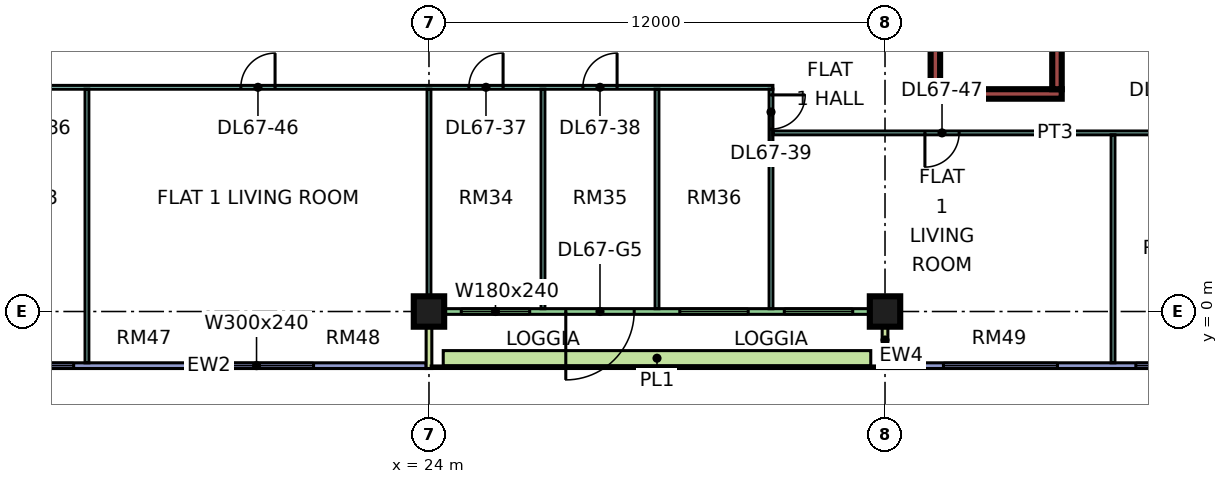
"""IFC4 building model, lengths in metres.
Left out: names, types, materials, properties, quantities, classifications, styles, units other than length and angle.
Written with IfcOpenShell. Run it as: python <this file> out.ifc"""

import sys

from ifc_helpers import new_model, si_unit, direction, frame, frame_2d, origin, origin_2d, place, context, subcontext, project, spatial, rectangle, extrude, element, fill, save


model = new_model("IFC4")
c1 = context("Model", 3, precision=1e-05, world=origin(), true_north=direction((0.0, 1.0)))
c2 = subcontext(c1, "Body", "Model", "MODEL_VIEW")
j1 = project(units=[si_unit("LENGTHUNIT", "METRE"), si_unit("PLANEANGLEUNIT", "RADIAN")], contexts=[c1])
p1 = place(None, origin())
s1 = spatial("IfcSite", under=j1, at=p1, CompositionType="ELEMENT")
p2 = place(p1, origin())
s2 = spatial("IfcBuilding", under=s1, at=p2, CompositionType="ELEMENT")
p3 = place(p2, frame((0.0, 0.0, 288.4)))
s3 = spatial("IfcBuildingStorey", under=s2, at=p3, CompositionType="ELEMENT", Elevation=288.4)
for number, where, z_axis, x_axis in (
    (1, (24.0, 0.0, 0.0), (0.0, 0.0, 1.0), (1.0, 0.0, 0.0)),
    (2, (36.0, 0.0, 0.0), (0.0, 0.0, 1.0), (1.0, 0.0, 0.0)),
):
    element("IfcColumn", number, at=place(p3, frame(where, z_axis=z_axis, x_axis=x_axis)), inside=s3, PredefinedType="COLUMN", context=c2, shape_type="SweptSolid", body=[
        extrude(rectangle(XDim=0.8, YDim=0.8, at=origin_2d()), origin(), (0.0, 0.0, 1.0), 3.75),
    ])
p4 = place(p3, frame((37.2, 5.725, 0.0), z_axis=(0.0, 0.0, 1.0), x_axis=(1.0, 0.0, 0.0)))
e3 = element("IfcWall", 3, at=p4, inside=s3, PredefinedType="SHEAR", context=c2, shape_type="SweptSolid", body=[
    extrude(rectangle(XDim=3.45, YDim=0.25, at=frame_2d((1.725, 0.0))), origin(), (0.0, 0.0, 1.0), 3.75),
])
for number, where, z_axis, x_axis in (
    (4, (37.325, 5.85, 0.0), (0.0, 0.0, 1.0), (0.0, 1.0, 0.0)),
    (5, (40.525, 5.85, 0.0), (0.0, 0.0, 1.0), (0.0, 1.0, 0.0)),
):
    element("IfcWall", number, at=place(p3, frame(where, z_axis=z_axis, x_axis=x_axis)), inside=s3, PredefinedType="SHEAR", context=c2, shape_type="SweptSolid", body=[
        extrude(rectangle(XDim=6.5, YDim=0.25, at=frame_2d((3.25, 0.0))), origin(), (0.0, 0.0, 1.0), 3.75),
    ])
p5 = place(p3, frame((12.5, -1.425, 0.0), z_axis=(0.0, 0.0, 1.0), x_axis=(1.0, 0.0, 0.0)))
e6 = element("IfcWall", 6, at=p5, inside=s3, PredefinedType="SOLIDWALL", context=c2, shape_type="SweptSolid", body=[
    extrude(rectangle(XDim=11.425, YDim=0.15, at=frame_2d((5.712, 0.0))), origin(), (0.0, 0.0, 1.0), 3.35),
])
p6 = place(p5, frame((0.35, 0.0, 0.45)))
e7 = element("IfcOpeningElement", 7, at=p6, cuts=e6, PredefinedType="OPENING", context=c2, shape_type="SweptSolid", body=[
    extrude(rectangle(XDim=1.8, YDim=2.4, at=frame_2d((0.9, 1.2))), frame((0.0, 0.085, 0.0), z_axis=(0.0, -1.0, 0.0), x_axis=(1.0, 0.0, 0.0)), (0.0, 0.0, 1.0), 0.17),
])
p7 = place(p5, frame((5.462, 0.0, 0.45)))
e8 = element("IfcOpeningElement", 8, at=p7, cuts=e6, PredefinedType="OPENING", context=c2, shape_type="SweptSolid", body=[
    extrude(rectangle(XDim=3.0, YDim=2.4, at=frame_2d((1.5, 1.2))), frame((0.0, 0.085, 0.0), z_axis=(0.0, -1.0, 0.0), x_axis=(1.0, 0.0, 0.0)), (0.0, 0.0, 1.0), 0.17),
])
p8 = place(p3, frame((24.075, 0.0, 0.0), z_axis=(0.0, 0.0, 1.0), x_axis=(1.0, 0.0, 0.0)))
e9 = element("IfcWall", 9, at=p8, inside=s3, PredefinedType="SOLIDWALL", context=c2, shape_type="SweptSolid", body=[
    extrude(rectangle(XDim=11.85, YDim=0.15, at=frame_2d((5.925, 0.0))), origin(), (0.0, 0.0, 1.0), 3.35),
])
p9 = place(p8, frame((0.775, 0.0, 0.45)))
e10 = element("IfcOpeningElement", 10, at=p9, cuts=e9, PredefinedType="OPENING", context=c2, shape_type="SweptSolid", body=[
    extrude(rectangle(XDim=1.8, YDim=2.4, at=frame_2d((0.9, 1.2))), frame((0.0, 0.085, 0.0), z_axis=(0.0, -1.0, 0.0), x_axis=(1.0, 0.0, 0.0)), (0.0, 0.0, 1.0), 0.17),
])
p10 = place(p8, frame((3.525, 0.0, 0.0)))
e11 = element("IfcOpeningElement", 11, at=p10, cuts=e9, PredefinedType="OPENING", context=c2, shape_type="SweptSolid", body=[
    extrude(rectangle(XDim=1.8, YDim=2.4, at=frame_2d((0.9, 1.2))), frame((0.0, 0.085, 0.0), z_axis=(0.0, -1.0, 0.0), x_axis=(1.0, 0.0, 0.0)), (0.0, 0.0, 1.0), 0.17),
])
p11 = place(p8, frame((6.525, 0.0, 0.45)))
e12 = element("IfcOpeningElement", 12, at=p11, cuts=e9, PredefinedType="OPENING", context=c2, shape_type="SweptSolid", body=[
    extrude(rectangle(XDim=1.8, YDim=2.4, at=frame_2d((0.9, 1.2))), frame((0.0, 0.085, 0.0), z_axis=(0.0, -1.0, 0.0), x_axis=(1.0, 0.0, 0.0)), (0.0, 0.0, 1.0), 0.17),
])
p12 = place(p8, frame((9.275, 0.0, 0.45)))
e13 = element("IfcOpeningElement", 13, at=p12, cuts=e9, PredefinedType="OPENING", context=c2, shape_type="SweptSolid", body=[
    extrude(rectangle(XDim=1.8, YDim=2.4, at=frame_2d((0.9, 1.2))), frame((0.0, 0.085, 0.0), z_axis=(0.0, -1.0, 0.0), x_axis=(1.0, 0.0, 0.0)), (0.0, 0.0, 1.0), 0.17),
])
for number, where, z_axis, x_axis in (
    (14, (24.0, -1.5, 0.0), (0.0, 0.0, 1.0), (0.0, 1.0, 0.0)),
    (15, (36.0, -1.5, 0.0), (0.0, 0.0, 1.0), (0.0, 1.0, 0.0)),
):
    element("IfcWall", number, at=place(p3, frame(where, z_axis=z_axis, x_axis=x_axis)), inside=s3, PredefinedType="SOLIDWALL", context=c2, shape_type="SweptSolid", body=[
        extrude(rectangle(XDim=1.5, YDim=0.15, at=frame_2d((0.75, 0.0))), origin(), (0.0, 0.0, 1.0), 3.35),
    ])
p13 = place(p3, frame((36.075, -1.425, 0.0), z_axis=(0.0, 0.0, 1.0), x_axis=(1.0, 0.0, 0.0)))
e16 = element("IfcWall", 16, at=p13, inside=s3, PredefinedType="SOLIDWALL", context=c2, shape_type="SweptSolid", body=[
    extrude(rectangle(XDim=11.85, YDim=0.15, at=frame_2d((5.925, 0.0))), origin(), (0.0, 0.0, 1.0), 3.35),
])
p14 = place(p13, frame((1.462, 0.0, 0.45)))
e17 = element("IfcOpeningElement", 17, at=p14, cuts=e16, PredefinedType="OPENING", context=c2, shape_type="SweptSolid", body=[
    extrude(rectangle(XDim=3.0, YDim=2.4, at=frame_2d((1.5, 1.2))), frame((0.0, 0.085, 0.0), z_axis=(0.0, -1.0, 0.0), x_axis=(1.0, 0.0, 0.0)), (0.0, 0.0, 1.0), 0.17),
])
p15 = place(p13, frame((6.525, 0.0, 0.45)))
e18 = element("IfcOpeningElement", 18, at=p15, cuts=e16, PredefinedType="OPENING", context=c2, shape_type="SweptSolid", body=[
    extrude(rectangle(XDim=1.8, YDim=2.4, at=frame_2d((0.9, 1.2))), frame((0.0, 0.085, 0.0), z_axis=(0.0, -1.0, 0.0), x_axis=(1.0, 0.0, 0.0)), (0.0, 0.0, 1.0), 0.17),
])
p16 = place(p13, frame((9.488, 0.0, 0.45)))
e19 = element("IfcOpeningElement", 19, at=p16, cuts=e16, PredefinedType="OPENING", context=c2, shape_type="SweptSolid", body=[
    extrude(rectangle(XDim=1.8, YDim=2.4, at=frame_2d((0.9, 1.2))), frame((0.0, 0.085, 0.0), z_axis=(0.0, -1.0, 0.0), x_axis=(1.0, 0.0, 0.0)), (0.0, 0.0, 1.0), 0.17),
])
p17 = place(p3, frame((24.375, -1.229, 0.0), z_axis=(0.0, 0.0, 1.0), x_axis=(1.0, 0.0, 0.0)))
e20 = element("IfcWall", 20, at=p17, inside=s3, PredefinedType="SOLIDWALL", context=c2, shape_type="SweptSolid", body=[
    extrude(rectangle(XDim=11.25, YDim=0.4, at=frame_2d((5.625, 0.0))), origin(), (0.0, 0.0, 1.0), 0.7),
])
p18 = place(p3, frame((11.95, 5.9, 0.0), z_axis=(0.0, 0.0, 1.0), x_axis=(1.0, 0.0, 0.0)))
e21 = element("IfcWall", 21, at=p18, inside=s3, PredefinedType="PARTITIONING", context=c2, shape_type="SweptSolid", body=[
    extrude(rectangle(XDim=21.1, YDim=0.1, at=frame_2d((10.55, 0.0))), origin(), (0.0, 0.0, 1.0), 3.35),
])
p19 = place(p18, frame((1.1, 0.0, 0.0)))
e22 = element("IfcOpeningElement", 22, at=p19, cuts=e21, PredefinedType="OPENING", context=c2, shape_type="SweptSolid", body=[
    extrude(rectangle(XDim=0.9, YDim=2.1, at=frame_2d((0.45, 1.05))), frame((0.0, 0.06, 0.0), z_axis=(0.0, -1.0, 0.0), x_axis=(1.0, 0.0, 0.0)), (0.0, 0.0, 1.0), 0.12),
])
p20 = place(p18, frame((13.1, 0.0, 0.0)))
e23 = element("IfcOpeningElement", 23, at=p20, cuts=e21, PredefinedType="OPENING", context=c2, shape_type="SweptSolid", body=[
    extrude(rectangle(XDim=0.9, YDim=2.1, at=frame_2d((0.45, 1.05))), frame((0.0, 0.06, 0.0), z_axis=(0.0, -1.0, 0.0), x_axis=(1.0, 0.0, 0.0)), (0.0, 0.0, 1.0), 0.12),
])
p21 = place(p18, frame((16.1, 0.0, 0.0)))
e24 = element("IfcOpeningElement", 24, at=p21, cuts=e21, PredefinedType="OPENING", context=c2, shape_type="SweptSolid", body=[
    extrude(rectangle(XDim=0.9, YDim=2.1, at=frame_2d((0.45, 1.05))), frame((0.0, 0.06, 0.0), z_axis=(0.0, -1.0, 0.0), x_axis=(1.0, 0.0, 0.0)), (0.0, 0.0, 1.0), 0.12),
])
p22 = place(p18, frame((7.1, 0.0, 0.0)))
e25 = element("IfcOpeningElement", 25, at=p22, cuts=e21, PredefinedType="OPENING", context=c2, shape_type="SweptSolid", body=[
    extrude(rectangle(XDim=0.9, YDim=2.1, at=frame_2d((0.45, 1.05))), frame((0.0, 0.06, 0.0), z_axis=(0.0, -1.0, 0.0), x_axis=(1.0, 0.0, 0.0)), (0.0, 0.0, 1.0), 0.12),
])
p23 = place(p3, frame((15.0, -1.35, 0.0), z_axis=(0.0, 0.0, 1.0), x_axis=(0.0, 1.0, 0.0)))
e26 = element("IfcWall", 26, at=p23, inside=s3, PredefinedType="PARTITIONING", context=c2, shape_type="SweptSolid", body=[
    extrude(rectangle(XDim=7.2, YDim=0.1, at=frame_2d((3.6, 0.0))), origin(), (0.0, 0.0, 1.0), 3.35),
])
p24 = place(p3, frame((24.0, 0.0, 0.0), z_axis=(0.0, 0.0, 1.0), x_axis=(0.0, 1.0, 0.0)))
e27 = element("IfcWall", 27, at=p24, inside=s3, PredefinedType="PARTITIONING", context=c2, shape_type="SweptSolid", body=[
    extrude(rectangle(XDim=5.85, YDim=0.1, at=frame_2d((2.925, 0.0))), origin(), (0.0, 0.0, 1.0), 3.35),
])
for number, where, z_axis, x_axis in (
    (28, (27.0, 0.074, 0.0), (0.0, 0.0, 1.0), (0.0, 1.0, 0.0)),
    (29, (30.0, 0.074, 0.0), (0.0, 0.0, 1.0), (0.0, 1.0, 0.0)),
):
    element("IfcWall", number, at=place(p3, frame(where, z_axis=z_axis, x_axis=x_axis)), inside=s3, PredefinedType="PARTITIONING", context=c2, shape_type="SweptSolid", body=[
        extrude(rectangle(XDim=5.776, YDim=0.1, at=frame_2d((2.888, 0.0))), origin(), (0.0, 0.0, 1.0), 3.35),
    ])
p25 = place(p3, frame((33.0, 0.074, 0.0), z_axis=(0.0, 0.0, 1.0), x_axis=(0.0, 1.0, 0.0)))
e30 = element("IfcWall", 30, at=p25, inside=s3, PredefinedType="PARTITIONING", context=c2, shape_type="SweptSolid", body=[
    extrude(rectangle(XDim=5.776, YDim=0.1, at=frame_2d((2.888, 0.0))), origin(), (0.0, 0.0, 1.0), 3.35),
])
p26 = place(p25, frame((4.726, 0.0, 0.0)))
e31 = element("IfcOpeningElement", 31, at=p26, cuts=e30, PredefinedType="OPENING", context=c2, shape_type="SweptSolid", body=[
    extrude(rectangle(XDim=0.9, YDim=2.1, at=frame_2d((0.45, 1.05))), frame((0.0, 0.06, 0.0), z_axis=(0.0, -1.0, 0.0), x_axis=(1.0, 0.0, 0.0)), (0.0, 0.0, 1.0), 0.12),
])
p27 = place(p3, frame((33.05, 4.7, 0.0), z_axis=(0.0, 0.0, 1.0), x_axis=(1.0, 0.0, 0.0)))
e32 = element("IfcWall", 32, at=p27, inside=s3, PredefinedType="PARTITIONING", context=c2, shape_type="SweptSolid", body=[
    extrude(rectangle(XDim=14.85, YDim=0.1, at=frame_2d((7.425, 0.0))), origin(), (0.0, 0.0, 1.0), 3.35),
])
p28 = place(p27, frame((10.0, 0.0, 0.0)))
e33 = element("IfcOpeningElement", 33, at=p28, cuts=e32, PredefinedType="OPENING", context=c2, shape_type="SweptSolid", body=[
    extrude(rectangle(XDim=0.9, YDim=2.1, at=frame_2d((0.45, 1.05))), frame((0.0, 0.06, 0.0), z_axis=(0.0, -1.0, 0.0), x_axis=(1.0, 0.0, 0.0)), (0.0, 0.0, 1.0), 0.12),
])
p29 = place(p27, frame((13.0, 0.0, 0.0)))
e34 = element("IfcOpeningElement", 34, at=p29, cuts=e32, PredefinedType="OPENING", context=c2, shape_type="SweptSolid", body=[
    extrude(rectangle(XDim=0.9, YDim=2.1, at=frame_2d((0.45, 1.05))), frame((0.0, 0.06, 0.0), z_axis=(0.0, -1.0, 0.0), x_axis=(1.0, 0.0, 0.0)), (0.0, 0.0, 1.0), 0.12),
])
p30 = place(p27, frame((4.0, 0.0, 0.0)))
e35 = element("IfcOpeningElement", 35, at=p30, cuts=e32, PredefinedType="OPENING", context=c2, shape_type="SweptSolid", body=[
    extrude(rectangle(XDim=0.9, YDim=2.1, at=frame_2d((0.45, 1.05))), frame((0.0, 0.06, 0.0), z_axis=(0.0, -1.0, 0.0), x_axis=(1.0, 0.0, 0.0)), (0.0, 0.0, 1.0), 0.12),
])
p31 = place(p3, frame((42.0, -1.35, 0.0), z_axis=(0.0, 0.0, 1.0), x_axis=(0.0, 1.0, 0.0)))
e36 = element("IfcWall", 36, at=p31, inside=s3, PredefinedType="PARTITIONING", context=c2, shape_type="SweptSolid", body=[
    extrude(rectangle(XDim=6.0, YDim=0.1, at=frame_2d((3.0, 0.0))), origin(), (0.0, 0.0, 1.0), 3.35),
])
p32 = place(p6, origin())
e37 = element("IfcWindow", 37, at=p32, inside=s3, PartitioningType="SINGLE_PANEL", PredefinedType="WINDOW", context=c2, shape_type="SweptSolid", body=[
    extrude(rectangle(XDim=1.8, YDim=2.4, at=frame_2d((0.9, 1.2))), frame((0.0, 0.03, 0.0), z_axis=(0.0, -1.0, 0.0), x_axis=(1.0, 0.0, 0.0)), (0.0, 0.0, 1.0), 0.06),
])
fill(e7, e37)
p33 = place(p7, origin())
e38 = element("IfcWindow", 38, at=p33, inside=s3, PartitioningType="SINGLE_PANEL", PredefinedType="WINDOW", context=c2, shape_type="SweptSolid", body=[
    extrude(rectangle(XDim=3.0, YDim=2.4, at=frame_2d((1.5, 1.2))), frame((0.0, 0.03, 0.0), z_axis=(0.0, -1.0, 0.0), x_axis=(1.0, 0.0, 0.0)), (0.0, 0.0, 1.0), 0.06),
])
fill(e8, e38)
p34 = place(p9, origin())
e39 = element("IfcWindow", 39, at=p34, inside=s3, PartitioningType="SINGLE_PANEL", PredefinedType="WINDOW", context=c2, shape_type="SweptSolid", body=[
    extrude(rectangle(XDim=1.8, YDim=2.4, at=frame_2d((0.9, 1.2))), frame((0.0, 0.03, 0.0), z_axis=(0.0, -1.0, 0.0), x_axis=(1.0, 0.0, 0.0)), (0.0, 0.0, 1.0), 0.06),
])
fill(e10, e39)
p35 = place(p10, frame((1.8, 0.0, 0.0), z_axis=(0.0, 0.0, 1.0), x_axis=(-1.0, 0.0, 0.0)))
e40 = element("IfcDoor", 40, at=p35, inside=s3, OperationType="DOUBLE_DOOR_SINGLE_SWING", PredefinedType="DOOR", context=c2, shape_type="SweptSolid", body=[
    extrude(rectangle(XDim=1.8, YDim=2.4, at=frame_2d((0.9, 1.2))), frame((0.0, 0.025, 0.0), z_axis=(0.0, -1.0, 0.0), x_axis=(1.0, 0.0, 0.0)), (0.0, 0.0, 1.0), 0.05),
])
fill(e11, e40)
p36 = place(p11, origin())
e41 = element("IfcWindow", 41, at=p36, inside=s3, PartitioningType="SINGLE_PANEL", PredefinedType="WINDOW", context=c2, shape_type="SweptSolid", body=[
    extrude(rectangle(XDim=1.8, YDim=2.4, at=frame_2d((0.9, 1.2))), frame((0.0, 0.03, 0.0), z_axis=(0.0, -1.0, 0.0), x_axis=(1.0, 0.0, 0.0)), (0.0, 0.0, 1.0), 0.06),
])
fill(e12, e41)
p37 = place(p12, origin())
e42 = element("IfcWindow", 42, at=p37, inside=s3, PartitioningType="SINGLE_PANEL", PredefinedType="WINDOW", context=c2, shape_type="SweptSolid", body=[
    extrude(rectangle(XDim=1.8, YDim=2.4, at=frame_2d((0.9, 1.2))), frame((0.0, 0.03, 0.0), z_axis=(0.0, -1.0, 0.0), x_axis=(1.0, 0.0, 0.0)), (0.0, 0.0, 1.0), 0.06),
])
fill(e13, e42)
p38 = place(p14, origin())
e43 = element("IfcWindow", 43, at=p38, inside=s3, PartitioningType="SINGLE_PANEL", PredefinedType="WINDOW", context=c2, shape_type="SweptSolid", body=[
    extrude(rectangle(XDim=3.0, YDim=2.4, at=frame_2d((1.5, 1.2))), frame((0.0, 0.03, 0.0), z_axis=(0.0, -1.0, 0.0), x_axis=(1.0, 0.0, 0.0)), (0.0, 0.0, 1.0), 0.06),
])
fill(e17, e43)
p39 = place(p15, origin())
e44 = element("IfcWindow", 44, at=p39, inside=s3, PartitioningType="SINGLE_PANEL", PredefinedType="WINDOW", context=c2, shape_type="SweptSolid", body=[
    extrude(rectangle(XDim=1.8, YDim=2.4, at=frame_2d((0.9, 1.2))), frame((0.0, 0.03, 0.0), z_axis=(0.0, -1.0, 0.0), x_axis=(1.0, 0.0, 0.0)), (0.0, 0.0, 1.0), 0.06),
])
fill(e18, e44)
p40 = place(p20, frame((0.9, 0.0, 0.0), z_axis=(0.0, 0.0, 1.0), x_axis=(-1.0, 0.0, 0.0)))
e45 = element("IfcDoor", 45, at=p40, inside=s3, OperationType="SINGLE_SWING_RIGHT", PredefinedType="DOOR", context=c2, shape_type="SweptSolid", body=[
    extrude(rectangle(XDim=0.9, YDim=2.1, at=frame_2d((0.45, 1.05))), frame((0.0, 0.025, 0.0), z_axis=(0.0, -1.0, 0.0), x_axis=(1.0, 0.0, 0.0)), (0.0, 0.0, 1.0), 0.05),
])
fill(e23, e45)
p41 = place(p21, frame((0.9, 0.0, 0.0), z_axis=(0.0, 0.0, 1.0), x_axis=(-1.0, 0.0, 0.0)))
e46 = element("IfcDoor", 46, at=p41, inside=s3, OperationType="SINGLE_SWING_RIGHT", PredefinedType="DOOR", context=c2, shape_type="SweptSolid", body=[
    extrude(rectangle(XDim=0.9, YDim=2.1, at=frame_2d((0.45, 1.05))), frame((0.0, 0.025, 0.0), z_axis=(0.0, -1.0, 0.0), x_axis=(1.0, 0.0, 0.0)), (0.0, 0.0, 1.0), 0.05),
])
fill(e24, e46)
p42 = place(p26, origin())
e47 = element("IfcDoor", 47, at=p42, inside=s3, OperationType="SINGLE_SWING_RIGHT", PredefinedType="DOOR", context=c2, shape_type="SweptSolid", body=[
    extrude(rectangle(XDim=0.9, YDim=2.1, at=frame_2d((0.45, 1.05))), frame((0.0, 0.025, 0.0), z_axis=(0.0, -1.0, 0.0), x_axis=(1.0, 0.0, 0.0)), (0.0, 0.0, 1.0), 0.05),
])
fill(e31, e47)
p43 = place(p22, frame((0.9, 0.0, 0.0), z_axis=(0.0, 0.0, 1.0), x_axis=(-1.0, 0.0, 0.0)))
e48 = element("IfcDoor", 48, at=p43, inside=s3, OperationType="SINGLE_SWING_RIGHT", PredefinedType="DOOR", context=c2, shape_type="SweptSolid", body=[
    extrude(rectangle(XDim=0.9, YDim=2.1, at=frame_2d((0.45, 1.05))), frame((0.0, 0.025, 0.0), z_axis=(0.0, -1.0, 0.0), x_axis=(1.0, 0.0, 0.0)), (0.0, 0.0, 1.0), 0.05),
])
fill(e25, e48)
p44 = place(p30, frame((0.9, 0.0, 0.0), z_axis=(0.0, 0.0, 1.0), x_axis=(-1.0, 0.0, 0.0)))
e49 = element("IfcDoor", 49, at=p44, inside=s3, OperationType="SINGLE_SWING_LEFT", PredefinedType="DOOR", context=c2, shape_type="SweptSolid", body=[
    extrude(rectangle(XDim=0.9, YDim=2.1, at=frame_2d((0.45, 1.05))), frame((0.0, 0.025, 0.0), z_axis=(0.0, -1.0, 0.0), x_axis=(1.0, 0.0, 0.0)), (0.0, 0.0, 1.0), 0.05),
])
fill(e35, e49)
save(model, sys.argv[1])
